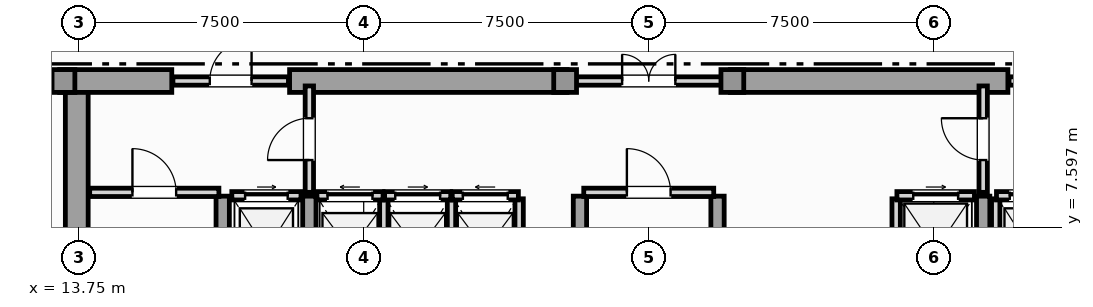
"""IFC4 building model, lengths in metres.
Left out: names, types, materials, properties, quantities, classifications, styles, units other than length and angle.
Written with IfcOpenShell. Run it as: python <this file> out.ifc"""

import sys

from ifc_helpers import new_model, si_unit, direction, frame, frame_2d, origin, origin_2d, place, context, subcontext, project, spatial, rectangle, extrude, element, fill, save


model = new_model("IFC4")
c1 = context("Model", 3, precision=1e-05, world=origin(), true_north=direction((0.0, 1.0)))
c2 = subcontext(c1, "Body", "Model", "MODEL_VIEW")
j1 = project(units=[si_unit("LENGTHUNIT", "METRE"), si_unit("PLANEANGLEUNIT", "RADIAN")], contexts=[c1])
p1 = place(None, origin())
s1 = spatial("IfcSite", under=j1, at=p1, CompositionType="ELEMENT")
p2 = place(p1, origin())
s2 = spatial("IfcBuilding", under=s1, at=p2, CompositionType="ELEMENT")
p3 = place(p2, frame((0.0, 0.0, 284.9)))
s3 = spatial("IfcBuildingStorey", under=s2, at=p3, CompositionType="ELEMENT", Elevation=284.9)
p4 = place(p3, frame((13.7, 0.92, 0.0), z_axis=(0.0, 0.0, 1.0), x_axis=(0.0, 1.0, 0.0)))
e1 = element("IfcWall", 1, at=p4, inside=s3, PredefinedType="SHEAR", context=c2, shape_type="SweptSolid", body=[
    extrude(rectangle(XDim=10.53, YDim=0.6, at=frame_2d((5.265, 0.0))), origin(), (0.0, 0.0, 1.0), 3.65),
])
p5 = place(p3, frame((13.25, 11.45, 0.0), z_axis=(0.0, 0.0, 1.0), x_axis=(1.0, 0.0, 0.0)))
e2 = element("IfcWall", 2, at=p5, inside=s3, PredefinedType="SHEAR", context=c2, shape_type="SweptSolid", body=[
    extrude(rectangle(XDim=2.95, YDim=0.6, at=frame_2d((1.475, 0.0))), origin(), (0.0, 0.0, 1.0), 3.65),
])
for number, where, z_axis, x_axis in (
    (3, (19.3, 11.45, 0.0), (0.0, 0.0, 1.0), (1.0, 0.0, 0.0)),
    (4, (30.9, 11.45, 0.0), (0.0, 0.0, 1.0), (1.0, 0.0, 0.0)),
):
    element("IfcWall", number, at=place(p3, frame(where, z_axis=z_axis, x_axis=x_axis)), inside=s3, PredefinedType="SHEAR", context=c2, shape_type="SweptSolid", body=[
        extrude(rectangle(XDim=7.3, YDim=0.6, at=frame_2d((3.65, 0.0))), origin(), (0.0, 0.0, 1.0), 3.65),
    ])
for number, where, z_axis, x_axis in (
    (5, (17.54, 0.92, 0.0), (0.0, 0.0, 1.0), (0.0, 1.0, 0.0)),
    (6, (19.82, 0.92, 0.0), (0.0, 0.0, 1.0), (0.0, 1.0, 0.0)),
    (7, (26.94, 0.92, 0.0), (0.0, 0.0, 1.0), (0.0, 1.0, 0.0)),
    (8, (30.56, 0.92, 0.0), (0.0, 0.0, 1.0), (0.0, 1.0, 0.0)),
    (9, (37.55, 0.92, 0.0), (0.0, 0.0, 1.0), (0.0, 1.0, 0.0)),
):
    element("IfcWall", number, at=place(p3, frame(where, z_axis=z_axis, x_axis=x_axis)), inside=s3, PredefinedType="SHEAR", context=c2, shape_type="SweptSolid", body=[
        extrude(rectangle(XDim=7.5, YDim=0.35, at=frame_2d((3.75, 0.0))), origin(), (0.0, 0.0, 1.0), 3.65),
    ])
for number, where, z_axis, x_axis in (
    (10, (13.35, 11.45, 0.0), (0.0, 0.0, 1.0), (1.0, 0.0, 0.0)),
    (11, (26.55, 11.45, 0.0), (0.0, 0.0, 1.0), (1.0, 0.0, 0.0)),
    (12, (30.95, 11.45, 0.0), (0.0, 0.0, 1.0), (1.0, 0.0, 0.0)),
):
    element("IfcColumn", number, at=place(p3, frame(where, z_axis=z_axis, x_axis=x_axis)), inside=s3, PredefinedType="COLUMN", context=c2, shape_type="SweptSolid", body=[
        extrude(rectangle(XDim=0.6, YDim=0.6, at=origin_2d()), origin(), (0.0, 0.0, 1.0), 3.85),
    ])
p6 = place(p3, frame((17.78, 8.43, 0.0), z_axis=(0.0, 0.0, 1.0), x_axis=(1.0, 0.0, 0.0)))
e13 = element("IfcWall", 13, at=p6, inside=s3, PredefinedType="SOLIDWALL", context=c2, shape_type="SweptSolid", body=[
    extrude(rectangle(XDim=1.82, YDim=0.22, at=frame_2d((0.91, 0.0))), origin(), (0.0, 0.0, 1.0), 3.65),
])
p7 = place(p6, frame((0.35, 0.0, 0.0)))
e14 = element("IfcOpeningElement", 14, at=p7, cuts=e13, PredefinedType="OPENING", context=c2, shape_type="SweptSolid", body=[
    extrude(rectangle(XDim=1.12, YDim=2.25, at=frame_2d((0.56, 1.125))), frame((0.0, 0.12, 0.0), z_axis=(0.0, -1.0, 0.0), x_axis=(1.0, 0.0, 0.0)), (0.0, 0.0, 1.0), 0.24),
])
p8 = place(p3, frame((37.88, 5.65, 0.0), z_axis=(0.0, 0.0, 1.0), x_axis=(0.0, 1.0, 0.0)))
e15 = element("IfcWall", 15, at=p8, inside=s3, PredefinedType="SOLIDWALL", context=c2, shape_type="SweptSolid", body=[
    extrude(rectangle(XDim=2.7, YDim=0.22, at=frame_2d((1.35, 0.0))), origin(), (0.0, 0.0, 1.0), 3.65),
])
p9 = place(p3, frame((37.9, 8.43, 0.0), z_axis=(0.0, 0.0, 1.0), x_axis=(1.0, 0.0, 0.0)))
e16 = element("IfcWall", 16, at=p9, inside=s3, PredefinedType="SOLIDWALL", context=c2, shape_type="SweptSolid", body=[
    extrude(rectangle(XDim=1.82, YDim=0.22, at=frame_2d((0.91, 0.0))), origin(), (0.0, 0.0, 1.0), 3.65),
])
p10 = place(p9, frame((0.35, 0.0, 0.0)))
e17 = element("IfcOpeningElement", 17, at=p10, cuts=e16, PredefinedType="OPENING", context=c2, shape_type="SweptSolid", body=[
    extrude(rectangle(XDim=1.12, YDim=2.25, at=frame_2d((0.56, 1.125))), frame((0.0, 0.12, 0.0), z_axis=(0.0, -1.0, 0.0), x_axis=(1.0, 0.0, 0.0)), (0.0, 0.0, 1.0), 0.24),
])
p11 = place(p3, frame((35.26, 5.65, 0.0), z_axis=(0.0, 0.0, 1.0), x_axis=(0.0, 1.0, 0.0)))
e18 = element("IfcWall", 18, at=p11, inside=s3, PredefinedType="SOLIDWALL", context=c2, shape_type="SweptSolid", body=[
    extrude(rectangle(XDim=2.7, YDim=0.22, at=frame_2d((1.35, 0.0))), origin(), (0.0, 0.0, 1.0), 3.65),
])
p12 = place(p3, frame((35.28, 8.43, 0.0), z_axis=(0.0, 0.0, 1.0), x_axis=(1.0, 0.0, 0.0)))
e19 = element("IfcWall", 19, at=p12, inside=s3, PredefinedType="SOLIDWALL", context=c2, shape_type="SweptSolid", body=[
    extrude(rectangle(XDim=2.04, YDim=0.22, at=frame_2d((1.02, 0.0))), origin(), (0.0, 0.0, 1.0), 3.65),
])
p13 = place(p12, frame((0.43, 0.0, 0.0)))
e20 = element("IfcOpeningElement", 20, at=p13, cuts=e19, PredefinedType="OPENING", context=c2, shape_type="SweptSolid", body=[
    extrude(rectangle(XDim=1.18, YDim=2.2, at=frame_2d((0.59, 1.1))), frame((0.0, 0.12, 0.0), z_axis=(0.0, -1.0, 0.0), x_axis=(1.0, 0.0, 0.0)), (0.0, 0.0, 1.0), 0.24),
])
p14 = place(p3, frame((21.78, 5.65, 0.0), z_axis=(0.0, 0.0, 1.0), x_axis=(0.0, 1.0, 0.0)))
e21 = element("IfcWall", 21, at=p14, inside=s3, PredefinedType="SOLIDWALL", context=c2, shape_type="SweptSolid", body=[
    extrude(rectangle(XDim=2.7, YDim=0.22, at=frame_2d((1.35, 0.0))), origin(), (0.0, 0.0, 1.0), 3.65),
])
p15 = place(p3, frame((20.02, 8.43, 0.0), z_axis=(0.0, 0.0, 1.0), x_axis=(1.0, 0.0, 0.0)))
e22 = element("IfcWall", 22, at=p15, inside=s3, PredefinedType="SOLIDWALL", context=c2, shape_type="SweptSolid", body=[
    extrude(rectangle(XDim=1.74, YDim=0.22, at=frame_2d((0.87, 0.0))), origin(), (0.0, 0.0, 1.0), 3.65),
])
p16 = place(p15, frame((0.28, 0.0, 0.0)))
e23 = element("IfcOpeningElement", 23, at=p16, cuts=e22, PredefinedType="OPENING", context=c2, shape_type="SweptSolid", body=[
    extrude(rectangle(XDim=1.18, YDim=2.2, at=frame_2d((0.59, 1.1))), frame((0.0, 0.12, 0.0), z_axis=(0.0, -1.0, 0.0), x_axis=(1.0, 0.0, 0.0)), (0.0, 0.0, 1.0), 0.24),
])
p17 = place(p3, frame((23.56, 5.65, 0.0), z_axis=(0.0, 0.0, 1.0), x_axis=(0.0, 1.0, 0.0)))
e24 = element("IfcWall", 24, at=p17, inside=s3, PredefinedType="SOLIDWALL", context=c2, shape_type="SweptSolid", body=[
    extrude(rectangle(XDim=2.7, YDim=0.22, at=frame_2d((1.35, 0.0))), origin(), (0.0, 0.0, 1.0), 3.65),
])
p18 = place(p3, frame((21.8, 8.43, 0.0), z_axis=(0.0, 0.0, 1.0), x_axis=(1.0, 0.0, 0.0)))
e25 = element("IfcWall", 25, at=p18, inside=s3, PredefinedType="SOLIDWALL", context=c2, shape_type="SweptSolid", body=[
    extrude(rectangle(XDim=1.74, YDim=0.22, at=frame_2d((0.87, 0.0))), origin(), (0.0, 0.0, 1.0), 3.65),
])
p19 = place(p18, frame((0.28, 0.0, 0.0)))
e26 = element("IfcOpeningElement", 26, at=p19, cuts=e25, PredefinedType="OPENING", context=c2, shape_type="SweptSolid", body=[
    extrude(rectangle(XDim=1.18, YDim=2.2, at=frame_2d((0.59, 1.1))), frame((0.0, 0.12, 0.0), z_axis=(0.0, -1.0, 0.0), x_axis=(1.0, 0.0, 0.0)), (0.0, 0.0, 1.0), 0.24),
])
p20 = place(p3, frame((25.34, 5.65, 0.0), z_axis=(0.0, 0.0, 1.0), x_axis=(0.0, 1.0, 0.0)))
e27 = element("IfcWall", 27, at=p20, inside=s3, PredefinedType="SOLIDWALL", context=c2, shape_type="SweptSolid", body=[
    extrude(rectangle(XDim=2.7, YDim=0.22, at=frame_2d((1.35, 0.0))), origin(), (0.0, 0.0, 1.0), 3.65),
])
p21 = place(p3, frame((23.58, 8.43, 0.0), z_axis=(0.0, 0.0, 1.0), x_axis=(1.0, 0.0, 0.0)))
e28 = element("IfcWall", 28, at=p21, inside=s3, PredefinedType="SOLIDWALL", context=c2, shape_type="SweptSolid", body=[
    extrude(rectangle(XDim=1.74, YDim=0.22, at=frame_2d((0.87, 0.0))), origin(), (0.0, 0.0, 1.0), 3.65),
])
p22 = place(p21, frame((0.28, 0.0, 0.0)))
e29 = element("IfcOpeningElement", 29, at=p22, cuts=e28, PredefinedType="OPENING", context=c2, shape_type="SweptSolid", body=[
    extrude(rectangle(XDim=1.18, YDim=2.2, at=frame_2d((0.59, 1.1))), frame((0.0, 0.12, 0.0), z_axis=(0.0, -1.0, 0.0), x_axis=(1.0, 0.0, 0.0)), (0.0, 0.0, 1.0), 0.24),
])
p23 = place(p3, frame((14.04, 8.52, 0.0), z_axis=(0.0, 0.0, 1.0), x_axis=(1.0, 0.0, 0.0)))
e30 = element("IfcWall", 30, at=p23, inside=s3, PredefinedType="SOLIDWALL", context=c2, shape_type="SweptSolid", body=[
    extrude(rectangle(XDim=3.4, YDim=0.22, at=frame_2d((1.7, 0.0))), origin(), (0.0, 0.0, 1.0), 3.65),
])
p24 = place(p23, frame((1.125, 0.0, 0.0)))
e31 = element("IfcOpeningElement", 31, at=p24, cuts=e30, PredefinedType="OPENING", context=c2, shape_type="SweptSolid", body=[
    extrude(rectangle(XDim=1.15, YDim=2.2, at=frame_2d((0.575, 1.1))), frame((0.0, 0.12, 0.0), z_axis=(0.0, -1.0, 0.0), x_axis=(1.0, 0.0, 0.0)), (0.0, 0.0, 1.0), 0.24),
])
p25 = place(p3, frame((27.04, 8.52, 0.0), z_axis=(0.0, 0.0, 1.0), x_axis=(1.0, 0.0, 0.0)))
e32 = element("IfcWall", 32, at=p25, inside=s3, PredefinedType="SOLIDWALL", context=c2, shape_type="SweptSolid", body=[
    extrude(rectangle(XDim=3.42, YDim=0.22, at=frame_2d((1.71, 0.0))), origin(), (0.0, 0.0, 1.0), 3.65),
])
p26 = place(p25, frame((1.135, 0.0, 0.0)))
e33 = element("IfcOpeningElement", 33, at=p26, cuts=e32, PredefinedType="OPENING", context=c2, shape_type="SweptSolid", body=[
    extrude(rectangle(XDim=1.15, YDim=2.2, at=frame_2d((0.575, 1.1))), frame((0.0, 0.12, 0.0), z_axis=(0.0, -1.0, 0.0), x_axis=(1.0, 0.0, 0.0)), (0.0, 0.0, 1.0), 0.24),
])
p27 = place(p3, frame((19.82, 8.52, 0.0), z_axis=(0.0, 0.0, 1.0), x_axis=(0.0, 1.0, 0.0)))
e34 = element("IfcWall", 34, at=p27, inside=s3, PredefinedType="SOLIDWALL", context=c2, shape_type="SweptSolid", body=[
    extrude(rectangle(XDim=2.8, YDim=0.22, at=frame_2d((1.4, 0.0))), origin(), (0.0, 0.0, 1.0), 3.106),
])
p28 = place(p27, frame((0.85, 0.0, 0.0)))
e35 = element("IfcOpeningElement", 35, at=p28, cuts=e34, PredefinedType="OPENING", context=c2, shape_type="SweptSolid", body=[
    extrude(rectangle(XDim=1.1, YDim=2.2, at=frame_2d((0.55, 1.1))), frame((0.0, 0.12, 0.0), z_axis=(0.0, -1.0, 0.0), x_axis=(1.0, 0.0, 0.0)), (0.0, 0.0, 1.0), 0.24),
])
p29 = place(p3, frame((37.55, 8.52, 0.0), z_axis=(0.0, 0.0, 1.0), x_axis=(0.0, 1.0, 0.0)))
e36 = element("IfcWall", 36, at=p29, inside=s3, PredefinedType="SOLIDWALL", context=c2, shape_type="SweptSolid", body=[
    extrude(rectangle(XDim=2.8, YDim=0.22, at=frame_2d((1.4, 0.0))), origin(), (0.0, 0.0, 1.0), 3.106),
])
p30 = place(p29, frame((0.85, 0.0, 0.0)))
e37 = element("IfcOpeningElement", 37, at=p30, cuts=e36, PredefinedType="OPENING", context=c2, shape_type="SweptSolid", body=[
    extrude(rectangle(XDim=1.1, YDim=2.2, at=frame_2d((0.55, 1.1))), frame((0.0, 0.12, 0.0), z_axis=(0.0, -1.0, 0.0), x_axis=(1.0, 0.0, 0.0)), (0.0, 0.0, 1.0), 0.24),
])
p31 = place(p3, frame((16.23, 11.45, 0.0), z_axis=(0.0, 0.0, 1.0), x_axis=(1.0, 0.0, 0.0)))
e38 = element("IfcWall", 38, at=p31, inside=s3, PredefinedType="SOLIDWALL", context=c2, shape_type="SweptSolid", body=[
    extrude(rectangle(XDim=3.04, YDim=0.22, at=frame_2d((1.52, 0.0))), origin(), (0.0, 0.0, 1.0), 3.65),
])
p32 = place(p31, frame((0.97, 0.0, 0.0)))
e39 = element("IfcOpeningElement", 39, at=p32, cuts=e38, PredefinedType="OPENING", context=c2, shape_type="SweptSolid", body=[
    extrude(rectangle(XDim=1.1, YDim=2.2, at=frame_2d((0.55, 1.1))), frame((0.0, 0.12, 0.0), z_axis=(0.0, -1.0, 0.0), x_axis=(1.0, 0.0, 0.0)), (0.0, 0.0, 1.0), 0.24),
])
p33 = place(p3, frame((26.63, 11.45, 0.0), z_axis=(0.0, 0.0, 1.0), x_axis=(1.0, 0.0, 0.0)))
e40 = element("IfcWall", 40, at=p33, inside=s3, PredefinedType="SOLIDWALL", context=c2, shape_type="SweptSolid", body=[
    extrude(rectangle(XDim=4.24, YDim=0.22, at=frame_2d((2.12, 0.0))), origin(), (0.0, 0.0, 1.0), 3.65),
])
p34 = place(p33, frame((1.42, 0.0, 0.0)))
e41 = element("IfcOpeningElement", 41, at=p34, cuts=e40, PredefinedType="OPENING", context=c2, shape_type="SweptSolid", body=[
    extrude(rectangle(XDim=1.4, YDim=2.2, at=frame_2d((0.7, 1.1))), frame((0.0, 0.12, 0.0), z_axis=(0.0, -1.0, 0.0), x_axis=(1.0, 0.0, 0.0)), (0.0, 0.0, 1.0), 0.24),
])
p35 = place(p3, frame((38.23, 11.45, 0.0), z_axis=(0.0, 0.0, 1.0), x_axis=(1.0, 0.0, 0.0)))
e42 = element("IfcWall", 42, at=p35, inside=s3, PredefinedType="SOLIDWALL", context=c2, shape_type="SweptSolid", body=[
    extrude(rectangle(XDim=3.04, YDim=0.22, at=frame_2d((1.52, 0.0))), origin(), (0.0, 0.0, 1.0), 3.65),
])
p36 = place(p35, frame((0.97, 0.0, 0.0)))
e43 = element("IfcOpeningElement", 43, at=p36, cuts=e42, PredefinedType="OPENING", context=c2, shape_type="SweptSolid", body=[
    extrude(rectangle(XDim=1.1, YDim=2.2, at=frame_2d((0.55, 1.1))), frame((0.0, 0.12, 0.0), z_axis=(0.0, -1.0, 0.0), x_axis=(1.0, 0.0, 0.0)), (0.0, 0.0, 1.0), 0.24),
])
p37 = place(p3, frame((8.574, 11.6, 0.0), z_axis=(0.0, 0.0, 1.0), x_axis=(1.0, 0.0, 0.0)))
e44 = element("IfcWall", 44, at=p37, inside=s3, PredefinedType="PARTITIONING", context=c2, shape_type="SweptSolid", body=[
    extrude(rectangle(XDim=4.571, YDim=0.18, at=frame_2d((2.286, 0.0))), origin(), (0.0, 0.0, 1.0), 3.65),
])
p38 = place(p37, frame((1.786, 0.0, 0.0)))
e45 = element("IfcOpeningElement", 45, at=p38, cuts=e44, PredefinedType="OPENING", context=c2, shape_type="SweptSolid", body=[
    extrude(rectangle(XDim=1.0, YDim=2.15, at=frame_2d((0.5, 1.075))), frame((0.0, 0.1, 0.0), z_axis=(0.0, -1.0, 0.0), x_axis=(1.0, 0.0, 0.0)), (0.0, 0.0, 1.0), 0.2),
])
p39 = place(p7, origin())
e46 = element("IfcDoor", 46, at=p39, inside=s3, OperationType="SLIDING_TO_RIGHT", PredefinedType="DOOR", context=c2, shape_type="SweptSolid", body=[
    extrude(rectangle(XDim=1.12, YDim=2.25, at=frame_2d((0.56, 1.125))), frame((0.0, 0.025, 0.0), z_axis=(0.0, -1.0, 0.0), x_axis=(1.0, 0.0, 0.0)), (0.0, 0.0, 1.0), 0.05),
])
fill(e14, e46)
p40 = place(p10, origin())
e47 = element("IfcDoor", 47, at=p40, inside=s3, OperationType="SLIDING_TO_LEFT", PredefinedType="DOOR", context=c2, shape_type="SweptSolid", body=[
    extrude(rectangle(XDim=1.12, YDim=2.25, at=frame_2d((0.56, 1.125))), frame((0.0, 0.025, 0.0), z_axis=(0.0, -1.0, 0.0), x_axis=(1.0, 0.0, 0.0)), (0.0, 0.0, 1.0), 0.05),
])
fill(e17, e47)
p41 = place(p13, origin())
e48 = element("IfcDoor", 48, at=p41, inside=s3, OperationType="SLIDING_TO_RIGHT", PredefinedType="DOOR", context=c2, shape_type="SweptSolid", body=[
    extrude(rectangle(XDim=1.18, YDim=2.2, at=frame_2d((0.59, 1.1))), frame((0.0, 0.025, 0.0), z_axis=(0.0, -1.0, 0.0), x_axis=(1.0, 0.0, 0.0)), (0.0, 0.0, 1.0), 0.05),
])
fill(e20, e48)
p42 = place(p16, origin())
e49 = element("IfcDoor", 49, at=p42, inside=s3, OperationType="SLIDING_TO_LEFT", PredefinedType="DOOR", context=c2, shape_type="SweptSolid", body=[
    extrude(rectangle(XDim=1.18, YDim=2.2, at=frame_2d((0.59, 1.1))), frame((0.0, 0.025, 0.0), z_axis=(0.0, -1.0, 0.0), x_axis=(1.0, 0.0, 0.0)), (0.0, 0.0, 1.0), 0.05),
])
fill(e23, e49)
p43 = place(p19, origin())
e50 = element("IfcDoor", 50, at=p43, inside=s3, OperationType="SLIDING_TO_RIGHT", PredefinedType="DOOR", context=c2, shape_type="SweptSolid", body=[
    extrude(rectangle(XDim=1.18, YDim=2.2, at=frame_2d((0.59, 1.1))), frame((0.0, 0.025, 0.0), z_axis=(0.0, -1.0, 0.0), x_axis=(1.0, 0.0, 0.0)), (0.0, 0.0, 1.0), 0.05),
])
fill(e26, e50)
p44 = place(p22, origin())
e51 = element("IfcDoor", 51, at=p44, inside=s3, OperationType="SLIDING_TO_LEFT", PredefinedType="DOOR", context=c2, shape_type="SweptSolid", body=[
    extrude(rectangle(XDim=1.18, YDim=2.2, at=frame_2d((0.59, 1.1))), frame((0.0, 0.025, 0.0), z_axis=(0.0, -1.0, 0.0), x_axis=(1.0, 0.0, 0.0)), (0.0, 0.0, 1.0), 0.05),
])
fill(e29, e51)
p45 = place(p24, origin())
e52 = element("IfcDoor", 52, at=p45, inside=s3, OperationType="SINGLE_SWING_LEFT", PredefinedType="DOOR", context=c2, shape_type="SweptSolid", body=[
    extrude(rectangle(XDim=1.15, YDim=2.2, at=frame_2d((0.575, 1.1))), frame((0.0, 0.025, 0.0), z_axis=(0.0, -1.0, 0.0), x_axis=(1.0, 0.0, 0.0)), (0.0, 0.0, 1.0), 0.05),
])
fill(e31, e52)
p46 = place(p26, origin())
e53 = element("IfcDoor", 53, at=p46, inside=s3, OperationType="SINGLE_SWING_LEFT", PredefinedType="DOOR", context=c2, shape_type="SweptSolid", body=[
    extrude(rectangle(XDim=1.15, YDim=2.2, at=frame_2d((0.575, 1.1))), frame((0.0, 0.025, 0.0), z_axis=(0.0, -1.0, 0.0), x_axis=(1.0, 0.0, 0.0)), (0.0, 0.0, 1.0), 0.05),
])
fill(e33, e53)
p47 = place(p28, origin())
e54 = element("IfcDoor", 54, at=p47, inside=s3, OperationType="SINGLE_SWING_LEFT", PredefinedType="DOOR", context=c2, shape_type="SweptSolid", body=[
    extrude(rectangle(XDim=1.1, YDim=2.2, at=frame_2d((0.55, 1.1))), frame((0.0, 0.025, 0.0), z_axis=(0.0, -1.0, 0.0), x_axis=(1.0, 0.0, 0.0)), (0.0, 0.0, 1.0), 0.05),
])
fill(e35, e54)
p48 = place(p30, origin())
e55 = element("IfcDoor", 55, at=p48, inside=s3, OperationType="SINGLE_SWING_RIGHT", PredefinedType="DOOR", context=c2, shape_type="SweptSolid", body=[
    extrude(rectangle(XDim=1.1, YDim=2.2, at=frame_2d((0.55, 1.1))), frame((0.0, 0.025, 0.0), z_axis=(0.0, -1.0, 0.0), x_axis=(1.0, 0.0, 0.0)), (0.0, 0.0, 1.0), 0.05),
])
fill(e37, e55)
p49 = place(p32, origin())
e56 = element("IfcDoor", 56, at=p49, inside=s3, OperationType="SINGLE_SWING_RIGHT", PredefinedType="DOOR", context=c2, shape_type="SweptSolid", body=[
    extrude(rectangle(XDim=1.1, YDim=2.2, at=frame_2d((0.55, 1.1))), frame((0.0, 0.025, 0.0), z_axis=(0.0, -1.0, 0.0), x_axis=(1.0, 0.0, 0.0)), (0.0, 0.0, 1.0), 0.05),
])
fill(e39, e56)
p50 = place(p34, origin())
e57 = element("IfcDoor", 57, at=p50, inside=s3, OperationType="DOUBLE_DOOR_SINGLE_SWING", PredefinedType="DOOR", context=c2, shape_type="SweptSolid", body=[
    extrude(rectangle(XDim=1.4, YDim=2.2, at=frame_2d((0.7, 1.1))), frame((0.0, 0.025, 0.0), z_axis=(0.0, -1.0, 0.0), x_axis=(1.0, 0.0, 0.0)), (0.0, 0.0, 1.0), 0.05),
])
fill(e41, e57)
save(model, sys.argv[1])
